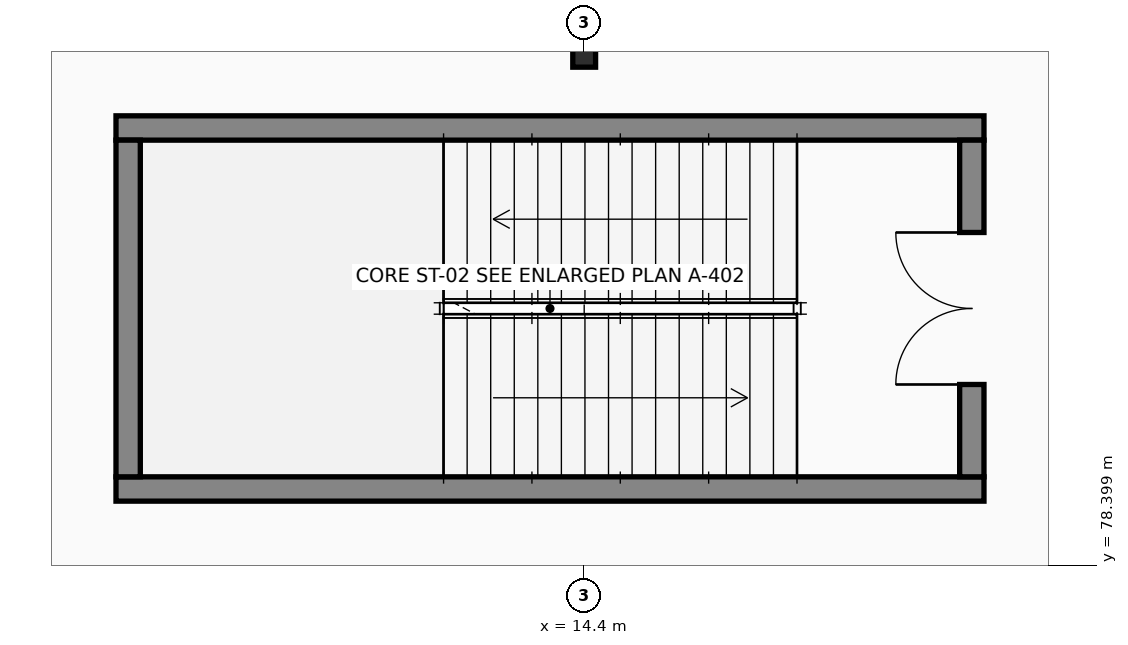
"""IFC4 building model, lengths in metres.
Left out: names, types, materials, properties, quantities, classifications, styles, units other than length and angle.
Written with IfcOpenShell. Run it as: python <this file> out.ifc"""

import sys

from ifc_helpers import new_model, si_unit, direction, frame, frame_2d, origin, origin_2d, place, context, subcontext, project, spatial, rectangle, i_section, extrude, element, fill, save


model = new_model("IFC4")
c1 = context("Model", 3, precision=1e-05, world=origin(), true_north=direction((0.0, 1.0)))
c2 = subcontext(c1, "Body", "Model", "MODEL_VIEW")
j1 = project(units=[si_unit("LENGTHUNIT", "METRE"), si_unit("PLANEANGLEUNIT", "RADIAN")], contexts=[c1])
p1 = place(None, origin())
s1 = spatial("IfcSite", under=j1, at=p1, CompositionType="ELEMENT")
p2 = place(p1, origin())
s2 = spatial("IfcBuilding", under=s1, at=p2, CompositionType="ELEMENT")
p3 = place(p2, origin())
s3 = spatial("IfcBuildingStorey", under=s2, at=p3, CompositionType="ELEMENT", Elevation=0.0)
p4 = place(p3, frame((14.4, 85.2, 0.0), z_axis=(0.0, 0.0, 1.0), x_axis=(1.0, 0.0, 0.0)))
e1 = element("IfcColumn", 1, at=p4, inside=s3, PredefinedType="COLUMN", context=c2, shape_type="SweptSolid", body=[
    extrude(i_section(OverallWidth=0.3, OverallDepth=0.5, WebThickness=0.014, FlangeThickness=0.028, at=origin_2d()), origin(), (0.0, 0.0, 1.0), 4.8),
])
for number, where, z_axis, x_axis in (
    (2, (8.24, 79.4, 0.0), (0.0, 0.0, 1.0), (1.0, 0.0, 0.0)),
    (3, (8.24, 84.15, 0.0), (0.0, 0.0, 1.0), (1.0, 0.0, 0.0)),
):
    element("IfcWall", number, at=place(p3, frame(where, z_axis=z_axis, x_axis=x_axis)), inside=s3, PredefinedType="SHEAR", context=c2, shape_type="SweptSolid", body=[
        extrude(rectangle(XDim=11.42, YDim=0.32, at=frame_2d((5.71, 0.0))), origin(), (0.0, 0.0, 1.0), 4.58),
    ])
p5 = place(p3, frame((8.4, 79.56, 0.0), z_axis=(0.0, 0.0, 1.0), x_axis=(0.0, 1.0, 0.0)))
e4 = element("IfcWall", 4, at=p5, inside=s3, PredefinedType="SHEAR", context=c2, shape_type="SweptSolid", body=[
    extrude(rectangle(XDim=4.43, YDim=0.32, at=frame_2d((2.215, 0.0))), origin(), (0.0, 0.0, 1.0), 4.58),
])
p6 = place(p3, frame((19.5, 79.56, 0.0), z_axis=(0.0, 0.0, 1.0), x_axis=(0.0, 1.0, 0.0)))
e5 = element("IfcWall", 5, at=p6, inside=s3, PredefinedType="SHEAR", context=c2, shape_type="SweptSolid", body=[
    extrude(rectangle(XDim=4.43, YDim=0.32, at=frame_2d((2.215, 0.0))), origin(), (0.0, 0.0, 1.0), 4.58),
])
p7 = place(p6, frame((1.215, 0.0, 0.0)))
e6 = element("IfcOpeningElement", 6, at=p7, cuts=e5, PredefinedType="OPENING", context=c2, shape_type="SweptSolid", body=[
    extrude(rectangle(XDim=2.0, YDim=2.15, at=frame_2d((1.0, 1.075))), frame((0.0, 0.17, 0.0), z_axis=(0.0, -1.0, 0.0), x_axis=(1.0, 0.0, 0.0)), (0.0, 0.0, 1.0), 0.34),
])
p8 = place(p7, origin())
e7 = element("IfcDoor", 7, at=p8, inside=s3, OperationType="DOUBLE_DOOR_SINGLE_SWING", PredefinedType="DOOR", context=c2, shape_type="SweptSolid", body=[
    extrude(rectangle(XDim=2.0, YDim=2.15, at=frame_2d((1.0, 1.075))), frame((0.0, 0.025, 0.0), z_axis=(0.0, -1.0, 0.0), x_axis=(1.0, 0.0, 0.0)), (0.0, 0.0, 1.0), 0.05),
])
fill(e6, e7)
save(model, sys.argv[1])
